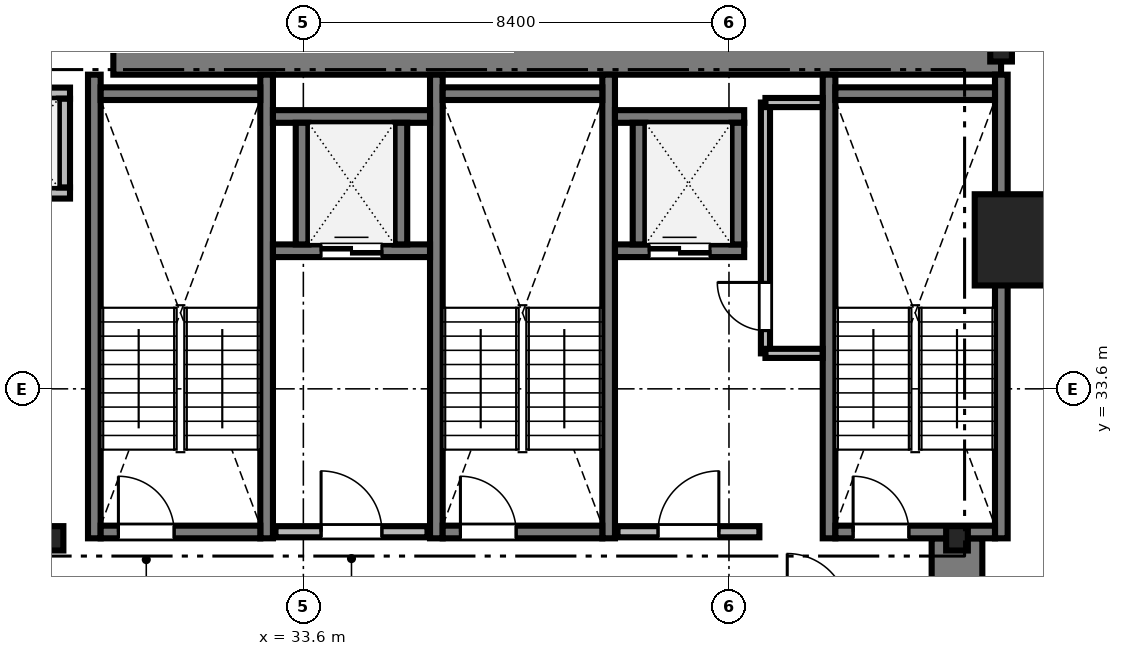
"""IFC4 building model, lengths in metres.
Left out: names, types, materials, properties, quantities, classifications, styles, units other than length and angle.
Written with IfcOpenShell. Run it as: python <this file> out.ifc"""

import sys

from ifc_helpers import new_model, si_unit, direction, frame, frame_2d, origin, origin_2d, place, context, subcontext, project, spatial, rectangle, i_section, extrude, source, transform, mapped, element, fill, save


model = new_model("IFC4")
c1 = context("Model", 3, precision=1e-05, world=origin(), true_north=direction((0.0, 1.0)))
c2 = subcontext(c1, "Body", "Model", "MODEL_VIEW")
j1 = project(units=[si_unit("LENGTHUNIT", "METRE"), si_unit("PLANEANGLEUNIT", "RADIAN")], contexts=[c1])
p1 = place(None, origin())
s1 = spatial("IfcSite", under=j1, at=p1, CompositionType="ELEMENT")
p2 = place(p1, origin())
s2 = spatial("IfcBuilding", under=s1, at=p2, CompositionType="ELEMENT")
p3 = place(p2, frame((0.0, 0.0, 42.2)))
s3 = spatial("IfcBuildingStorey", under=s2, at=p3, CompositionType="ELEMENT", Elevation=42.2)
m1 = source(origin(), c2, "Body", "SweptSolid", [
    extrude(rectangle(XDim=17.52, YDim=1.0, at=frame_2d((8.76, 0.0))), origin(), (0.0, 0.0, 1.0), 3.41),
])
p4 = place(p3, frame((29.85, 40.3, 0.0), z_axis=(0.0, 0.0, 1.0), x_axis=(1.0, 0.0, 0.0)))
e1 = element("IfcWall", 1, at=p4, inside=s3, PredefinedType="SHEAR", context=c2, shape_type="MappedRepresentation", body=[
    mapped(m1, transform((0.0, 0.0, 0.0), scale=1.0)),
])
m2 = source(origin(), c2, "Body", "SweptSolid", [
    extrude(rectangle(XDim=13.15, YDim=1.0, at=frame_2d((6.575, 0.0))), origin(), (0.0, 0.0, 1.0), 3.41),
])
p5 = place(p3, frame((46.5, 17.5, 0.0), z_axis=(0.0, 0.0, 1.0), x_axis=(0.0, 1.0, 0.0)))
e2 = element("IfcWall", 2, at=p5, inside=s3, PredefinedType="SHEAR", context=c2, shape_type="MappedRepresentation", body=[
    mapped(m2, transform((0.0, 0.0, 0.0), scale=1.0)),
])
m3 = source(origin(), c2, "Body", "SweptSolid", [
    extrude(i_section(OverallWidth=0.428, OverallDepth=0.481, WebThickness=0.04, FlangeThickness=0.063, FilletRadius=0.015, at=origin_2d()), origin(), (0.0, 0.0, 1.0), 3.41),
])
for number, where, z_axis, x_axis in (
    (3, (28.65, 30.65, 0.0), (0.0, 0.0, 1.0), (1.0, 0.0, 0.0)),
    (4, (46.5, 30.65, 0.0), (0.0, 0.0, 1.0), (1.0, 0.0, 0.0)),
    (5, (47.37, 40.3, 0.0), (0.0, 0.0, 1.0), (1.0, 0.0, 0.0)),
):
    element("IfcColumn", number, at=place(p3, frame(where, z_axis=z_axis, x_axis=x_axis)), inside=s3, PredefinedType="COLUMN", context=c2, shape_type="MappedRepresentation", body=[
        mapped(m3, transform((0.0, 0.0, 0.0), scale=1.0)),
    ])
m4 = source(origin(), c2, "Body", "SweptSolid", [
    extrude(rectangle(XDim=1.8, YDim=1.8, at=origin_2d()), origin(), (0.0, 0.0, 1.0), 3.41),
])
p6 = place(p3, frame((47.75, 36.54, 0.0), z_axis=(0.0, 0.0, 1.0), x_axis=(1.0, 0.0, 0.0)))
e6 = element("IfcColumn", 6, at=p6, inside=s3, PredefinedType="COLUMN", context=c2, shape_type="MappedRepresentation", body=[
    mapped(m4, transform((0.0, 0.0, 0.0), scale=1.0)),
])
m5 = source(origin(), c2, "Body", "SweptSolid", [
    extrude(rectangle(XDim=9.15, YDim=0.25, at=frame_2d((4.575, 0.0))), origin(), (0.0, 0.0, 1.0), 3.45),
])
for number, where, z_axis, x_axis in (
    (7, (29.475, 30.65, 0.0), (0.0, 0.0, 1.0), (0.0, 1.0, 0.0)),
    (8, (32.875, 30.65, 0.0), (0.0, 0.0, 1.0), (0.0, 1.0, 0.0)),
):
    element("IfcWall", number, at=place(p3, frame(where, z_axis=z_axis, x_axis=x_axis)), inside=s3, PredefinedType="SOLIDWALL", context=c2, shape_type="MappedRepresentation", body=[
        mapped(m5, transform((0.0, 0.0, 0.0), scale=1.0)),
    ])
m6 = source(origin(), c2, "Body", "SweptSolid", [
    extrude(rectangle(XDim=3.15, YDim=0.25, at=frame_2d((1.575, 0.0))), origin(), (0.0, 0.0, 1.0), 3.45),
])
p7 = place(p3, frame((29.6, 39.425, 0.0), z_axis=(0.0, 0.0, 1.0), x_axis=(1.0, 0.0, 0.0)))
e9 = element("IfcWall", 9, at=p7, inside=s3, PredefinedType="SOLIDWALL", context=c2, shape_type="MappedRepresentation", body=[
    mapped(m6, transform((0.0, 0.0, 0.0), scale=1.0)),
])
p8 = place(p3, frame((29.6, 30.775, 0.0), z_axis=(0.0, 0.0, 1.0), x_axis=(1.0, 0.0, 0.0)))
e10 = element("IfcWall", 10, at=p8, inside=s3, PredefinedType="SOLIDWALL", context=c2, shape_type="MappedRepresentation", body=[
    mapped(m6, transform((0.0, 0.0, 0.0), scale=1.0)),
])
m7 = source(origin(), c2, "Body", "SweptSolid", [
    extrude(rectangle(XDim=1.1, YDim=2.2, at=frame_2d((0.55, 1.1))), frame((0.0, 0.135, 0.0), z_axis=(0.0, -1.0, 0.0), x_axis=(1.0, 0.0, 0.0)), (0.0, 0.0, 1.0), 0.27),
])
p9 = place(p8, frame((0.35, 0.0, 0.0)))
e11 = element("IfcOpeningElement", 11, at=p9, cuts=e10, PredefinedType="OPENING", context=c2, shape_type="MappedRepresentation", body=[
    mapped(m7, transform((0.0, 0.0, 0.0), scale=1.0)),
])
for number, where, z_axis, x_axis in (
    (12, (36.225, 30.65, 0.0), (0.0, 0.0, 1.0), (0.0, 1.0, 0.0)),
    (13, (39.625, 30.65, 0.0), (0.0, 0.0, 1.0), (0.0, 1.0, 0.0)),
):
    element("IfcWall", number, at=place(p3, frame(where, z_axis=z_axis, x_axis=x_axis)), inside=s3, PredefinedType="SOLIDWALL", context=c2, shape_type="MappedRepresentation", body=[
        mapped(m5, transform((0.0, 0.0, 0.0), scale=1.0)),
    ])
p10 = place(p3, frame((36.35, 39.425, 0.0), z_axis=(0.0, 0.0, 1.0), x_axis=(1.0, 0.0, 0.0)))
e14 = element("IfcWall", 14, at=p10, inside=s3, PredefinedType="SOLIDWALL", context=c2, shape_type="MappedRepresentation", body=[
    mapped(m6, transform((0.0, 0.0, 0.0), scale=1.0)),
])
p11 = place(p3, frame((36.35, 30.775, 0.0), z_axis=(0.0, 0.0, 1.0), x_axis=(1.0, 0.0, 0.0)))
e15 = element("IfcWall", 15, at=p11, inside=s3, PredefinedType="SOLIDWALL", context=c2, shape_type="MappedRepresentation", body=[
    mapped(m6, transform((0.0, 0.0, 0.0), scale=1.0)),
])
p12 = place(p11, frame((0.35, 0.0, 0.0)))
e16 = element("IfcOpeningElement", 16, at=p12, cuts=e15, PredefinedType="OPENING", context=c2, shape_type="MappedRepresentation", body=[
    mapped(m7, transform((0.0, 0.0, 0.0), scale=1.0)),
])
for number, where, z_axis, x_axis in (
    (17, (43.975, 30.65, 0.0), (0.0, 0.0, 1.0), (0.0, 1.0, 0.0)),
    (18, (47.375, 30.65, 0.0), (0.0, 0.0, 1.0), (0.0, 1.0, 0.0)),
):
    element("IfcWall", number, at=place(p3, frame(where, z_axis=z_axis, x_axis=x_axis)), inside=s3, PredefinedType="SOLIDWALL", context=c2, shape_type="MappedRepresentation", body=[
        mapped(m5, transform((0.0, 0.0, 0.0), scale=1.0)),
    ])
p13 = place(p3, frame((44.1, 39.425, 0.0), z_axis=(0.0, 0.0, 1.0), x_axis=(1.0, 0.0, 0.0)))
e19 = element("IfcWall", 19, at=p13, inside=s3, PredefinedType="SOLIDWALL", context=c2, shape_type="MappedRepresentation", body=[
    mapped(m6, transform((0.0, 0.0, 0.0), scale=1.0)),
])
p14 = place(p3, frame((44.1, 30.775, 0.0), z_axis=(0.0, 0.0, 1.0), x_axis=(1.0, 0.0, 0.0)))
e20 = element("IfcWall", 20, at=p14, inside=s3, PredefinedType="SOLIDWALL", context=c2, shape_type="MappedRepresentation", body=[
    mapped(m6, transform((0.0, 0.0, 0.0), scale=1.0)),
])
p15 = place(p14, frame((0.35, 0.0, 0.0)))
e21 = element("IfcOpeningElement", 21, at=p15, cuts=e20, PredefinedType="OPENING", context=c2, shape_type="MappedRepresentation", body=[
    mapped(m7, transform((0.0, 0.0, 0.0), scale=1.0)),
])
m8 = source(origin(), c2, "Body", "SweptSolid", [
    extrude(rectangle(XDim=3.0, YDim=0.22, at=frame_2d((1.5, 0.0))), origin(), (0.0, 0.0, 1.0), 3.41),
])
p16 = place(p3, frame((33.05, 30.78, 0.0), z_axis=(0.0, 0.0, 1.0), x_axis=(1.0, 0.0, 0.0)))
e22 = element("IfcWall", 22, at=p16, inside=s3, PredefinedType="SOLIDWALL", context=c2, shape_type="MappedRepresentation", body=[
    mapped(m8, transform((0.0, 0.0, 0.0), scale=1.0)),
])
m9 = source(origin(), c2, "Body", "SweptSolid", [
    extrude(rectangle(XDim=1.2, YDim=2.2, at=frame_2d((0.6, 1.1))), frame((0.0, 0.12, 0.0), z_axis=(0.0, -1.0, 0.0), x_axis=(1.0, 0.0, 0.0)), (0.0, 0.0, 1.0), 0.24),
])
p17 = place(p16, frame((0.9, 0.0, 0.0)))
e23 = element("IfcOpeningElement", 23, at=p17, cuts=e22, PredefinedType="OPENING", context=c2, shape_type="MappedRepresentation", body=[
    mapped(m9, transform((0.0, 0.0, 0.0), scale=1.0)),
])
m10 = source(origin(), c2, "Body", "SweptSolid", [
    extrude(rectangle(XDim=2.8, YDim=0.22, at=frame_2d((1.4, 0.0))), origin(), (0.0, 0.0, 1.0), 3.41),
])
p18 = place(p3, frame((39.8, 30.78, 0.0), z_axis=(0.0, 0.0, 1.0), x_axis=(1.0, 0.0, 0.0)))
e24 = element("IfcWall", 24, at=p18, inside=s3, PredefinedType="SOLIDWALL", context=c2, shape_type="MappedRepresentation", body=[
    mapped(m10, transform((0.0, 0.0, 0.0), scale=1.0)),
])
p19 = place(p18, frame((0.8, 0.0, 0.0)))
e25 = element("IfcOpeningElement", 25, at=p19, cuts=e24, PredefinedType="OPENING", context=c2, shape_type="MappedRepresentation", body=[
    mapped(m9, transform((0.0, 0.0, 0.0), scale=1.0)),
])
m11 = source(origin(), c2, "Body", "SweptSolid", [
    extrude(rectangle(XDim=1.99, YDim=0.22, at=frame_2d((0.995, 0.0))), origin(), (0.0, 0.0, 1.0), 3.41),
])
p20 = place(p3, frame((27.005, 37.465, 0.0), z_axis=(0.0, 0.0, 1.0), x_axis=(1.0, 0.0, 0.0)))
e26 = element("IfcWall", 26, at=p20, inside=s3, PredefinedType="SOLIDWALL", context=c2, shape_type="MappedRepresentation", body=[
    mapped(m11, transform((0.0, 0.0, 0.0), scale=1.0)),
])
m12 = source(origin(), c2, "Body", "SweptSolid", [
    extrude(rectangle(XDim=1.1, YDim=2.2, at=frame_2d((0.55, 1.1))), frame((0.0, 0.12, 0.0), z_axis=(0.0, -1.0, 0.0), x_axis=(1.0, 0.0, 0.0)), (0.0, 0.0, 1.0), 0.24),
])
p21 = place(p20, frame((0.445, 0.0, 0.0)))
e27 = element("IfcOpeningElement", 27, at=p21, cuts=e26, PredefinedType="OPENING", context=c2, shape_type="MappedRepresentation", body=[
    mapped(m12, transform((0.0, 0.0, 0.0), scale=1.0)),
])
p22 = place(p3, frame((27.005, 39.435, 0.0), z_axis=(0.0, 0.0, 1.0), x_axis=(1.0, 0.0, 0.0)))
e28 = element("IfcWall", 28, at=p22, inside=s3, PredefinedType="SOLIDWALL", context=c2, shape_type="MappedRepresentation", body=[
    mapped(m11, transform((0.0, 0.0, 0.0), scale=1.0)),
])
m13 = source(origin(), c2, "Body", "SweptSolid", [
    extrude(rectangle(XDim=1.75, YDim=0.22, at=frame_2d((0.875, 0.0))), origin(), (0.0, 0.0, 1.0), 3.41),
])
p23 = place(p3, frame((28.885, 37.575, 0.0), z_axis=(0.0, 0.0, 1.0), x_axis=(0.0, 1.0, 0.0)))
e29 = element("IfcWall", 29, at=p23, inside=s3, PredefinedType="SOLIDWALL", context=c2, shape_type="MappedRepresentation", body=[
    mapped(m13, transform((0.0, 0.0, 0.0), scale=1.0)),
])
m14 = source(origin(), c2, "Body", "SweptSolid", [
    extrude(rectangle(XDim=3.1, YDim=0.25, at=frame_2d((1.55, 0.0))), origin(), (0.0, 0.0, 1.0), 3.41),
])
p24 = place(p3, frame((33.0, 36.325, 0.0), z_axis=(0.0, 0.0, 1.0), x_axis=(1.0, 0.0, 0.0)))
e30 = element("IfcWall", 30, at=p24, inside=s3, PredefinedType="SOLIDWALL", context=c2, shape_type="MappedRepresentation", body=[
    mapped(m14, transform((0.0, 0.0, 0.0), scale=1.0)),
])
m15 = source(origin(), c2, "Body", "SweptSolid", [
    extrude(rectangle(XDim=1.2, YDim=2.25, at=frame_2d((0.6, 1.125))), frame((0.0, 0.135, 0.0), z_axis=(0.0, -1.0, 0.0), x_axis=(1.0, 0.0, 0.0)), (0.0, 0.0, 1.0), 0.27),
])
p25 = place(p24, frame((0.95, 0.0, 0.0)))
e31 = element("IfcOpeningElement", 31, at=p25, cuts=e30, PredefinedType="OPENING", context=c2, shape_type="MappedRepresentation", body=[
    mapped(m15, transform((0.0, 0.0, 0.0), scale=1.0)),
])
p26 = place(p3, frame((33.0, 38.975, 0.0), z_axis=(0.0, 0.0, 1.0), x_axis=(1.0, 0.0, 0.0)))
e32 = element("IfcWall", 32, at=p26, inside=s3, PredefinedType="SOLIDWALL", context=c2, shape_type="MappedRepresentation", body=[
    mapped(m14, transform((0.0, 0.0, 0.0), scale=1.0)),
])
m16 = source(origin(), c2, "Body", "SweptSolid", [
    extrude(rectangle(XDim=2.4, YDim=0.25, at=frame_2d((1.2, 0.0))), origin(), (0.0, 0.0, 1.0), 3.41),
])
for number, where, z_axis, x_axis in (
    (33, (33.575, 36.45, 0.0), (0.0, 0.0, 1.0), (0.0, 1.0, 0.0)),
    (34, (35.525, 36.45, 0.0), (0.0, 0.0, 1.0), (0.0, 1.0, 0.0)),
):
    element("IfcWall", number, at=place(p3, frame(where, z_axis=z_axis, x_axis=x_axis)), inside=s3, PredefinedType="SOLIDWALL", context=c2, shape_type="MappedRepresentation", body=[
        mapped(m16, transform((0.0, 0.0, 0.0), scale=1.0)),
    ])
m17 = source(origin(), c2, "Body", "SweptSolid", [
    extrude(rectangle(XDim=2.55, YDim=0.25, at=frame_2d((1.275, 0.0))), origin(), (0.0, 0.0, 1.0), 3.41),
])
p27 = place(p3, frame((39.75, 36.325, 0.0), z_axis=(0.0, 0.0, 1.0), x_axis=(1.0, 0.0, 0.0)))
e35 = element("IfcWall", 35, at=p27, inside=s3, PredefinedType="SOLIDWALL", context=c2, shape_type="MappedRepresentation", body=[
    mapped(m17, transform((0.0, 0.0, 0.0), scale=1.0)),
])
p28 = place(p27, frame((0.675, 0.0, 0.0)))
e36 = element("IfcOpeningElement", 36, at=p28, cuts=e35, PredefinedType="OPENING", context=c2, shape_type="MappedRepresentation", body=[
    mapped(m15, transform((0.0, 0.0, 0.0), scale=1.0)),
])
p29 = place(p3, frame((39.75, 38.975, 0.0), z_axis=(0.0, 0.0, 1.0), x_axis=(1.0, 0.0, 0.0)))
e37 = element("IfcWall", 37, at=p29, inside=s3, PredefinedType="SOLIDWALL", context=c2, shape_type="MappedRepresentation", body=[
    mapped(m17, transform((0.0, 0.0, 0.0), scale=1.0)),
])
for number, where, z_axis, x_axis in (
    (38, (40.225, 36.45, 0.0), (0.0, 0.0, 1.0), (0.0, 1.0, 0.0)),
    (39, (42.175, 36.45, 0.0), (0.0, 0.0, 1.0), (0.0, 1.0, 0.0)),
):
    element("IfcWall", number, at=place(p3, frame(where, z_axis=z_axis, x_axis=x_axis)), inside=s3, PredefinedType="SOLIDWALL", context=c2, shape_type="MappedRepresentation", body=[
        mapped(m16, transform((0.0, 0.0, 0.0), scale=1.0)),
    ])
m18 = source(origin(), c2, "Body", "SweptSolid", [
    extrude(rectangle(XDim=4.95, YDim=0.18, at=frame_2d((2.475, 0.0))), origin(), (0.0, 0.0, 1.0), 3.41),
])
p30 = place(p3, frame((42.72, 34.3, 0.0), z_axis=(0.0, 0.0, 1.0), x_axis=(0.0, 1.0, 0.0)))
e40 = element("IfcWall", 40, at=p30, inside=s3, PredefinedType="PARTITIONING", context=c2, shape_type="MappedRepresentation", body=[
    mapped(m18, transform((0.0, 0.0, 0.0), scale=1.0)),
])
m19 = source(origin(), c2, "Body", "SweptSolid", [
    extrude(rectangle(XDim=0.95, YDim=2.15, at=frame_2d((0.475, 1.075))), frame((0.0, 0.1, 0.0), z_axis=(0.0, -1.0, 0.0), x_axis=(1.0, 0.0, 0.0)), (0.0, 0.0, 1.0), 0.2),
])
p31 = place(p30, frame((0.45, 0.0, 0.0)))
e41 = element("IfcOpeningElement", 41, at=p31, cuts=e40, PredefinedType="OPENING", context=c2, shape_type="MappedRepresentation", body=[
    mapped(m19, transform((0.0, 0.0, 0.0), scale=1.0)),
])
m20 = source(origin(), c2, "Body", "SweptSolid", [
    extrude(rectangle(XDim=1.128, YDim=0.18, at=frame_2d((0.564, 0.0))), origin(), (0.0, 0.0, 1.0), 3.41),
])
for number, where, z_axis, x_axis in (
    (42, (42.72, 34.3, 0.0), (0.0, 0.0, 1.0), (1.0, 0.0, 0.0)),
    (43, (42.72, 39.25, 0.0), (0.0, 0.0, 1.0), (1.0, 0.0, 0.0)),
):
    element("IfcWall", number, at=place(p3, frame(where, z_axis=z_axis, x_axis=x_axis)), inside=s3, PredefinedType="PARTITIONING", context=c2, shape_type="MappedRepresentation", body=[
        mapped(m20, transform((0.0, 0.0, 0.0), scale=1.0)),
    ])
m21 = source(origin(), c2, "Body", "SweptSolid", [
    extrude(rectangle(XDim=1.1, YDim=2.2, at=frame_2d((0.55, 1.1))), frame((0.0, 0.025, 0.0), z_axis=(0.0, -1.0, 0.0), x_axis=(1.0, 0.0, 0.0)), (0.0, 0.0, 1.0), 0.05),
])
p32 = place(p9, origin())
e44 = element("IfcDoor", 44, at=p32, inside=s3, OperationType="SINGLE_SWING_LEFT", PredefinedType="DOOR", context=c2, shape_type="MappedRepresentation", body=[
    mapped(m21, transform((0.0, 0.0, 0.0), scale=1.0)),
])
fill(e11, e44)
p33 = place(p12, origin())
e45 = element("IfcDoor", 45, at=p33, inside=s3, OperationType="SINGLE_SWING_LEFT", PredefinedType="DOOR", context=c2, shape_type="MappedRepresentation", body=[
    mapped(m21, transform((0.0, 0.0, 0.0), scale=1.0)),
])
fill(e16, e45)
p34 = place(p15, origin())
e46 = element("IfcDoor", 46, at=p34, inside=s3, OperationType="SINGLE_SWING_LEFT", PredefinedType="DOOR", context=c2, shape_type="MappedRepresentation", body=[
    mapped(m21, transform((0.0, 0.0, 0.0), scale=1.0)),
])
fill(e21, e46)
m22 = source(origin(), c2, "Body", "SweptSolid", [
    extrude(rectangle(XDim=1.2, YDim=2.2, at=frame_2d((0.6, 1.1))), frame((0.0, 0.025, 0.0), z_axis=(0.0, -1.0, 0.0), x_axis=(1.0, 0.0, 0.0)), (0.0, 0.0, 1.0), 0.05),
])
p35 = place(p17, origin())
e47 = element("IfcDoor", 47, at=p35, inside=s3, OperationType="SINGLE_SWING_LEFT", PredefinedType="DOOR", context=c2, shape_type="MappedRepresentation", body=[
    mapped(m22, transform((0.0, 0.0, 0.0), scale=1.0)),
])
fill(e23, e47)
p36 = place(p19, origin())
e48 = element("IfcDoor", 48, at=p36, inside=s3, OperationType="SINGLE_SWING_RIGHT", PredefinedType="DOOR", context=c2, shape_type="MappedRepresentation", body=[
    mapped(m22, transform((0.0, 0.0, 0.0), scale=1.0)),
])
fill(e25, e48)
m23 = source(origin(), c2, "Body", "SweptSolid", [
    extrude(rectangle(XDim=1.2, YDim=2.25, at=frame_2d((0.6, 1.125))), frame((0.0, 0.025, 0.0), z_axis=(0.0, -1.0, 0.0), x_axis=(1.0, 0.0, 0.0)), (0.0, 0.0, 1.0), 0.05),
])
p37 = place(p25, origin())
e49 = element("IfcDoor", 49, at=p37, inside=s3, OperationType="DOUBLE_DOOR_SLIDING", PredefinedType="DOOR", context=c2, shape_type="MappedRepresentation", body=[
    mapped(m23, transform((0.0, 0.0, 0.0), scale=1.0)),
])
fill(e31, e49)
p38 = place(p28, origin())
e50 = element("IfcDoor", 50, at=p38, inside=s3, OperationType="DOUBLE_DOOR_SLIDING", PredefinedType="DOOR", context=c2, shape_type="MappedRepresentation", body=[
    mapped(m23, transform((0.0, 0.0, 0.0), scale=1.0)),
])
fill(e36, e50)
m24 = source(origin(), c2, "Body", "SweptSolid", [
    extrude(rectangle(XDim=0.95, YDim=2.15, at=frame_2d((0.475, 1.075))), frame((0.0, 0.025, 0.0), z_axis=(0.0, -1.0, 0.0), x_axis=(1.0, 0.0, 0.0)), (0.0, 0.0, 1.0), 0.05),
])
p39 = place(p31, origin())
e51 = element("IfcDoor", 51, at=p39, inside=s3, OperationType="SINGLE_SWING_RIGHT", PredefinedType="DOOR", context=c2, shape_type="MappedRepresentation", body=[
    mapped(m24, transform((0.0, 0.0, 0.0), scale=1.0)),
])
fill(e41, e51)
save(model, sys.argv[1])
